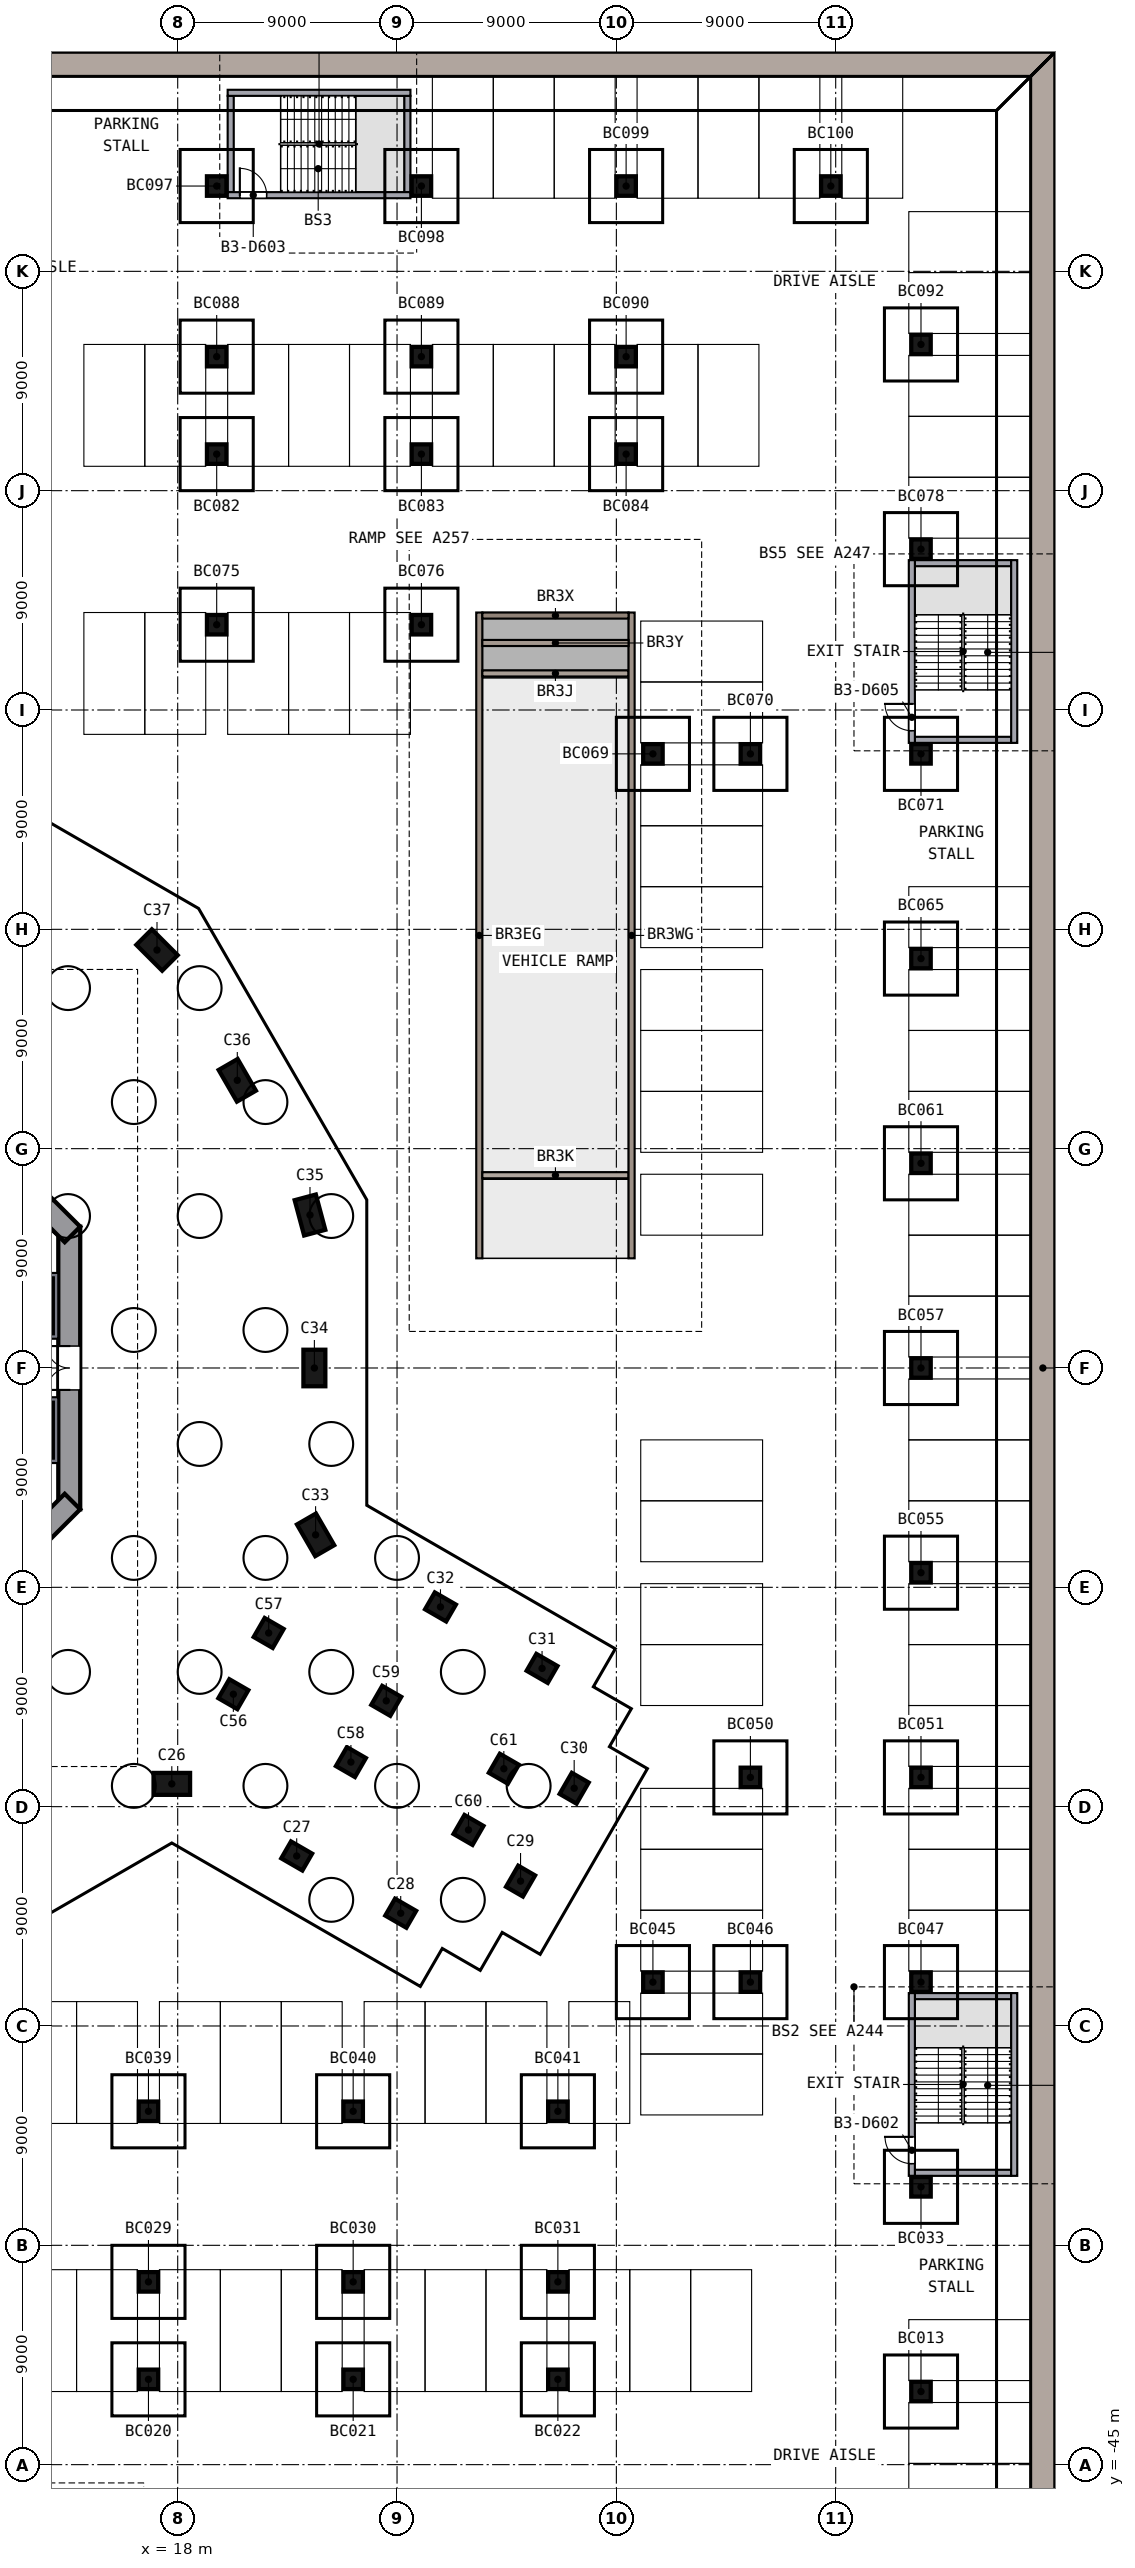
"""IFC4 building model, lengths in metres.
Left out: names, types, materials, properties, quantities, classifications, styles, units other than length and angle.
Written with IfcOpenShell. Run it as: python <this file> out.ifc"""

import sys

from ifc_helpers import new_model, si_unit, direction, frame, frame_2d, origin, origin_2d, place, context, subcontext, project, spatial, polyline, rectangle, outline, extrude, element, fill, save


model = new_model("IFC4")
c1 = context("Model", 3, precision=1e-05, world=origin(), true_north=direction((0.0, 1.0)))
c2 = subcontext(c1, "Body", "Model", "MODEL_VIEW")
j1 = project(units=[si_unit("LENGTHUNIT", "METRE"), si_unit("PLANEANGLEUNIT", "RADIAN")], contexts=[c1])
p1 = place(None, origin())
s1 = spatial("IfcSite", under=j1, at=p1, CompositionType="ELEMENT")
p2 = place(p1, origin())
s2 = spatial("IfcBuilding", under=s1, at=p2, CompositionType="ELEMENT")
p3 = place(p2, frame((0.0, 0.0, -11.7)))
s3 = spatial("IfcBuildingStorey", under=s2, at=p3, CompositionType="ELEMENT", Elevation=-11.7)
p4 = place(p3, frame((17.758, -17.065, 0.0), z_axis=(0.0, 0.0, 1.0), x_axis=(-1.0, 0.0, 0.0)))
e1 = element("IfcColumn", 1, at=p4, inside=s3, PredefinedType="COLUMN", context=c2, shape_type="SweptSolid", body=[
    extrude(rectangle(XDim=1.5, YDim=0.9, at=origin_2d()), origin(), (0.0, 0.0, 1.0), 3.45),
])
for number, where, z_axis, x_axis in (
    (2, (22.883, -20.024, 0.0), (0.0, 0.0, 1.0), (0.866, -0.5, 0.0)),
    (3, (27.151, -22.373, 0.0), (0.0, 0.0, 1.0), (0.866, -0.5, 0.0)),
    (4, (32.069, -21.055, 0.0), (0.0, 0.0, 1.0), (0.5, 0.866, 0.0)),
    (5, (34.269, -17.245, 0.0), (0.0, 0.0, 1.0), (0.5, 0.866, 0.0)),
    (6, (32.951, -12.327, 0.0), (0.0, 0.0, 1.0), (-0.866, 0.5, 0.0)),
    (7, (28.783, -9.805, 0.0), (0.0, 0.0, 1.0), (-0.866, 0.5, 0.0)),
):
    element("IfcColumn", number, at=place(p3, frame(where, z_axis=z_axis, x_axis=x_axis)), inside=s3, PredefinedType="COLUMN", context=c2, shape_type="SweptSolid", body=[
        extrude(rectangle(XDim=1.0, YDim=0.8, at=origin_2d()), origin(), (0.0, 0.0, 1.0), 3.45),
    ])
for number, where, z_axis, x_axis in (
    (8, (23.658, -6.846, 0.0), (0.0, 0.0, 1.0), (0.5, -0.866, 0.0)),
    (9, (23.608, 0.0, 0.0), (0.0, 0.0, 1.0), (0.0, 1.0, 0.0)),
    (10, (23.428, 6.278, 0.0), (0.0, 0.0, 1.0), (0.259, -0.966, 0.0)),
    (11, (20.445, 11.804, 0.0), (0.0, 0.0, 1.0), (-0.5, 0.866, 0.0)),
    (12, (17.151, 17.151, 0.0), (0.0, 0.0, 1.0), (0.707, -0.707, 0.0)),
):
    element("IfcColumn", number, at=place(p3, frame(where, z_axis=z_axis, x_axis=x_axis)), inside=s3, PredefinedType="COLUMN", context=c2, shape_type="SweptSolid", body=[
        extrude(rectangle(XDim=1.5, YDim=0.9, at=origin_2d()), origin(), (0.0, 0.0, 1.0), 3.45),
    ])
for number, where, z_axis, x_axis in (
    (13, (20.283, -13.385, 0.0), (0.0, 0.0, 1.0), (0.866, -0.5, 0.0)),
    (14, (21.733, -10.873, 0.0), (0.0, 0.0, 1.0), (0.866, -0.5, 0.0)),
    (15, (25.108, -16.17, 0.0), (0.0, 0.0, 1.0), (0.866, -0.5, 0.0)),
    (16, (26.558, -13.659, 0.0), (0.0, 0.0, 1.0), (0.866, -0.5, 0.0)),
    (17, (29.932, -18.956, 0.0), (0.0, 0.0, 1.0), (0.866, -0.5, 0.0)),
    (18, (31.382, -16.444, 0.0), (0.0, 0.0, 1.0), (0.866, -0.5, 0.0)),
):
    element("IfcColumn", number, at=place(p3, frame(where, z_axis=z_axis, x_axis=x_axis)), inside=s3, PredefinedType="COLUMN", context=c2, shape_type="SweptSolid", body=[
        extrude(rectangle(XDim=0.9, YDim=0.9, at=origin_2d()), origin(), (0.0, 0.0, 1.0), 3.45),
    ])
p5 = place(p3, frame((13.55, -5.799, 0.0), z_axis=(0.0, 0.0, 1.0), x_axis=(0.0, 1.0, 0.0)))
e19 = element("IfcWall", 19, at=p5, inside=s3, PredefinedType="SHEAR", context=c2, shape_type="SweptSolid", body=[
    extrude(rectangle(XDim=11.598, YDim=0.9, at=frame_2d((5.799, 0.0))), origin(), (0.0, 0.0, 1.0), 3.9),
])
p6 = place(p5, frame((4.899, 0.0, 0.0)))
e20 = element("IfcOpeningElement", 20, at=p6, cuts=e19, PredefinedType="OPENING", context=c2, shape_type="SweptSolid", body=[
    extrude(rectangle(XDim=1.8, YDim=2.1, at=frame_2d((0.9, 1.05))), frame((0.0, 0.46, 0.0), z_axis=(0.0, -1.0, 0.0), x_axis=(1.0, 0.0, 0.0)), (0.0, 0.0, 1.0), 0.92),
])
for number, where, z_axis, x_axis in (
    (21, (13.682, 5.481, 0.0), (0.0, 0.0, 1.0), (-0.707, 0.707, 0.0)),
    (22, (5.481, -13.682, 0.0), (0.0, 0.0, 1.0), (0.707, 0.707, 0.0)),
):
    element("IfcWall", number, at=place(p3, frame(where, z_axis=z_axis, x_axis=x_axis)), inside=s3, PredefinedType="SHEAR", context=c2, shape_type="SweptSolid", body=[
        extrude(rectangle(XDim=11.598, YDim=0.9, at=frame_2d((5.799, 0.0))), origin(), (0.0, 0.0, 1.0), 3.9),
    ])
p7 = place(p3, frame((0.0, 0.0, -0.8)))
e23 = element("IfcWall", 23, at=p7, inside=s3, PredefinedType="SOLIDWALL", context=c2, shape_type="SweptSolid", body=[
    extrude(outline(polyline([(54.0, 54.0), (-54.0, 54.0), (-53.0, 53.0), (53.0, 53.0), (54.0, 54.0)])), origin(), (0.0, 0.0, 1.0), 4.7),
])
p8 = place(p3, frame((0.0, 0.0, -0.8)))
e24 = element("IfcWall", 24, at=p8, inside=s3, PredefinedType="SOLIDWALL", context=c2, shape_type="SweptSolid", body=[
    extrude(outline(polyline([(54.0, -54.0), (54.0, 54.0), (53.0, 53.0), (53.0, -53.0), (54.0, -54.0)])), origin(), (0.0, 0.0, 1.0), 4.7),
])
for number, where, z_axis, x_axis in (
    (25, (48.5, -42.0, -0.8), (0.0, 0.0, 1.0), (1.0, 0.0, 0.0)),
    (26, (16.8, -41.5, -0.8), (0.0, 0.0, 1.0), (1.0, 0.0, 0.0)),
    (27, (25.2, -41.5, -0.8), (0.0, 0.0, 1.0), (1.0, 0.0, 0.0)),
    (28, (33.6, -41.5, -0.8), (0.0, 0.0, 1.0), (1.0, 0.0, 0.0)),
    (29, (16.8, -37.5, -0.8), (0.0, 0.0, 1.0), (1.0, 0.0, 0.0)),
    (30, (25.2, -37.5, -0.8), (0.0, 0.0, 1.0), (1.0, 0.0, 0.0)),
    (31, (33.6, -37.5, -0.8), (0.0, 0.0, 1.0), (1.0, 0.0, 0.0)),
    (32, (48.5, -33.6, -0.8), (0.0, 0.0, 1.0), (1.0, 0.0, 0.0)),
    (33, (16.8, -30.5, -0.8), (0.0, 0.0, 1.0), (1.0, 0.0, 0.0)),
    (34, (25.2, -30.5, -0.8), (0.0, 0.0, 1.0), (1.0, 0.0, 0.0)),
    (35, (33.6, -30.5, -0.8), (0.0, 0.0, 1.0), (1.0, 0.0, 0.0)),
    (36, (37.5, -25.2, -0.8), (0.0, 0.0, 1.0), (1.0, 0.0, 0.0)),
    (37, (41.5, -25.2, -0.8), (0.0, 0.0, 1.0), (1.0, 0.0, 0.0)),
    (38, (48.5, -25.2, -0.8), (0.0, 0.0, 1.0), (1.0, 0.0, 0.0)),
    (39, (41.5, -16.8, -0.8), (0.0, 0.0, 1.0), (1.0, 0.0, 0.0)),
    (40, (48.5, -16.8, -0.8), (0.0, 0.0, 1.0), (1.0, 0.0, 0.0)),
    (41, (48.5, -8.4, -0.8), (0.0, 0.0, 1.0), (1.0, 0.0, 0.0)),
    (42, (48.5, 0.0, -0.8), (0.0, 0.0, 1.0), (1.0, 0.0, 0.0)),
    (43, (48.5, 8.4, -0.8), (0.0, 0.0, 1.0), (1.0, 0.0, 0.0)),
    (44, (48.5, 16.8, -0.8), (0.0, 0.0, 1.0), (1.0, 0.0, 0.0)),
    (45, (37.5, 25.2, -0.8), (0.0, 0.0, 1.0), (1.0, 0.0, 0.0)),
    (46, (41.5, 25.2, -0.8), (0.0, 0.0, 1.0), (1.0, 0.0, 0.0)),
    (47, (48.5, 25.2, -0.8), (0.0, 0.0, 1.0), (1.0, 0.0, 0.0)),
    (48, (19.6, 30.5, -0.8), (0.0, 0.0, 1.0), (1.0, 0.0, 0.0)),
    (49, (28.0, 30.5, -0.8), (0.0, 0.0, 1.0), (1.0, 0.0, 0.0)),
    (50, (48.5, 33.6, -0.8), (0.0, 0.0, 1.0), (1.0, 0.0, 0.0)),
    (51, (19.6, 37.5, -0.8), (0.0, 0.0, 1.0), (1.0, 0.0, 0.0)),
    (52, (28.0, 37.5, -0.8), (0.0, 0.0, 1.0), (1.0, 0.0, 0.0)),
    (53, (36.4, 37.5, -0.8), (0.0, 0.0, 1.0), (1.0, 0.0, 0.0)),
    (54, (19.6, 41.5, -0.8), (0.0, 0.0, 1.0), (1.0, 0.0, 0.0)),
    (55, (28.0, 41.5, -0.8), (0.0, 0.0, 1.0), (1.0, 0.0, 0.0)),
    (56, (36.4, 41.5, -0.8), (0.0, 0.0, 1.0), (1.0, 0.0, 0.0)),
    (57, (48.5, 42.0, -0.8), (0.0, 0.0, 1.0), (1.0, 0.0, 0.0)),
    (58, (19.6, 48.5, -0.8), (0.0, 0.0, 1.0), (1.0, 0.0, 0.0)),
    (59, (28.0, 48.5, -0.8), (0.0, 0.0, 1.0), (1.0, 0.0, 0.0)),
    (60, (36.4, 48.5, -0.8), (0.0, 0.0, 1.0), (1.0, 0.0, 0.0)),
    (61, (44.8, 48.5, -0.8), (0.0, 0.0, 1.0), (1.0, 0.0, 0.0)),
):
    element("IfcColumn", number, at=place(p3, frame(where, z_axis=z_axis, x_axis=x_axis)), inside=s3, PredefinedType="COLUMN", context=c2, shape_type="SweptSolid", body=[
        extrude(rectangle(XDim=0.8, YDim=0.8, at=origin_2d()), origin(), (0.0, 0.0, 1.0), 4.7),
    ])
for number, where, z_axis, x_axis in (
    (62, (36.625, 31.0, 0.0), (0.0, 0.0, 1.0), (0.0, -1.0, 0.0)),
    (63, (30.375, 31.0, 0.0), (0.0, 0.0, 1.0), (0.0, -1.0, 0.0)),
):
    element("IfcWall", number, at=place(p3, frame(where, z_axis=z_axis, x_axis=x_axis)), inside=s3, PredefinedType="SOLIDWALL", context=c2, shape_type="SweptSolid", body=[
        extrude(rectangle(XDim=26.5, YDim=0.25, at=frame_2d((13.25, 0.0))), origin(), (0.0, 0.0, 1.0), 5.02),
    ])
p9 = place(p3, frame((36.5, 30.875, 0.0), z_axis=(0.0, 0.0, 1.0), x_axis=(-1.0, 0.0, 0.0)))
e64 = element("IfcWall", 64, at=p9, inside=s3, PredefinedType="SOLIDWALL", context=c2, shape_type="SweptSolid", body=[
    extrude(rectangle(XDim=6.0, YDim=0.25, at=frame_2d((3.0, 0.0))), origin(), (0.0, 0.0, 1.0), 3.55),
])
p10 = place(p3, frame((36.5, 28.5, 0.0), z_axis=(0.0, 0.0, 1.0), x_axis=(-1.0, 0.0, 0.0)))
e65 = element("IfcWall", 65, at=p10, inside=s3, PredefinedType="SOLIDWALL", context=c2, shape_type="SweptSolid", body=[
    extrude(rectangle(XDim=6.0, YDim=0.25, at=frame_2d((3.0, 0.0))), origin(), (0.0, 0.0, 1.0), 3.734),
])
p11 = place(p3, frame((36.5, 7.909, 0.0), z_axis=(0.0, 0.0, 1.0), x_axis=(-1.0, 0.0, 0.0)))
e66 = element("IfcWall", 66, at=p11, inside=s3, PredefinedType="SOLIDWALL", context=c2, shape_type="SweptSolid", body=[
    extrude(rectangle(XDim=6.0, YDim=0.25, at=frame_2d((3.0, 0.0))), origin(), (0.0, 0.0, 1.0), 0.395),
])
p12 = place(p3, frame((36.5, 29.75, 0.0), z_axis=(0.0, 0.0, 1.0), x_axis=(-1.0, 0.0, 0.0)))
e67 = element("IfcWall", 67, at=p12, inside=s3, PredefinedType="SOLIDWALL", context=c2, shape_type="SweptSolid", body=[
    extrude(rectangle(XDim=6.0, YDim=0.25, at=frame_2d((3.0, 0.0))), origin(), (0.0, 0.0, 1.0), 3.471),
])
p13 = place(p3, origin())
e68 = element("IfcWall", 68, at=p13, inside=s3, PredefinedType="SOLIDWALL", context=c2, shape_type="SweptSolid", body=[
    extrude(outline(polyline([(13.1, -3.9), (10.9, -3.9), (10.9, -3.7), (12.9, -3.7), (12.9, -1.4), (10.9, -1.4), (10.9, -1.2), (13.1, -1.2), (13.1, -3.9)])), origin(), (0.0, 0.0, 1.0), 3.45),
])
p14 = place(p3, origin())
e69 = element("IfcWall", 69, at=p14, inside=s3, PredefinedType="SOLIDWALL", context=c2, shape_type="SweptSolid", body=[
    extrude(outline(polyline([(13.1, 3.9), (13.1, 1.2), (10.9, 1.2), (10.9, 1.4), (12.9, 1.4), (12.9, 3.7), (10.9, 3.7), (10.9, 3.9), (13.1, 3.9)])), origin(), (0.0, 0.0, 1.0), 3.45),
])
p15 = place(p3, frame((48.125, -33.15, 0.0), z_axis=(0.0, 0.0, 1.0), x_axis=(0.0, 1.0, 0.0)))
e70 = element("IfcWall", 70, at=p15, inside=s3, PredefinedType="SOLIDWALL", context=c2, shape_type="SweptSolid", body=[
    extrude(rectangle(XDim=7.5, YDim=0.25, at=frame_2d((3.75, 0.0))), origin(), (0.0, 0.0, 1.0), 3.9),
])
p16 = place(p15, frame((0.5, 0.0, 0.0)))
e71 = element("IfcOpeningElement", 71, at=p16, cuts=e70, PredefinedType="OPENING", context=c2, shape_type="SweptSolid", body=[
    extrude(rectangle(XDim=1.1, YDim=2.1, at=frame_2d((0.55, 1.05))), frame((0.0, 0.135, 0.0), z_axis=(0.0, -1.0, 0.0), x_axis=(1.0, 0.0, 0.0)), (0.0, 0.0, 1.0), 0.27),
])
p17 = place(p3, frame((52.325, -33.15, 0.0), z_axis=(0.0, 0.0, 1.0), x_axis=(0.0, 1.0, 0.0)))
e72 = element("IfcWall", 72, at=p17, inside=s3, PredefinedType="SOLIDWALL", context=c2, shape_type="SweptSolid", body=[
    extrude(rectangle(XDim=7.5, YDim=0.25, at=frame_2d((3.75, 0.0))), origin(), (0.0, 0.0, 1.0), 3.9),
])
for number, where, z_axis, x_axis in (
    (73, (52.2, -33.025, 0.0), (0.0, 0.0, 1.0), (-1.0, 0.0, 0.0)),
    (74, (52.2, -25.775, 0.0), (0.0, 0.0, 1.0), (-1.0, 0.0, 0.0)),
):
    element("IfcWall", number, at=place(p3, frame(where, z_axis=z_axis, x_axis=x_axis)), inside=s3, PredefinedType="SOLIDWALL", context=c2, shape_type="SweptSolid", body=[
        extrude(rectangle(XDim=3.95, YDim=0.25, at=frame_2d((1.975, 0.0))), origin(), (0.0, 0.0, 1.0), 3.9),
    ])
p18 = place(p3, frame((20.05, 52.325, 0.0), z_axis=(0.0, 0.0, 1.0), x_axis=(1.0, 0.0, 0.0)))
e75 = element("IfcWall", 75, at=p18, inside=s3, PredefinedType="SOLIDWALL", context=c2, shape_type="SweptSolid", body=[
    extrude(rectangle(XDim=7.5, YDim=0.25, at=frame_2d((3.75, 0.0))), origin(), (0.0, 0.0, 1.0), 3.9),
])
p19 = place(p3, frame((20.05, 48.125, 0.0), z_axis=(0.0, 0.0, 1.0), x_axis=(1.0, 0.0, 0.0)))
e76 = element("IfcWall", 76, at=p19, inside=s3, PredefinedType="SOLIDWALL", context=c2, shape_type="SweptSolid", body=[
    extrude(rectangle(XDim=7.5, YDim=0.25, at=frame_2d((3.75, 0.0))), origin(), (0.0, 0.0, 1.0), 3.9),
])
p20 = place(p19, frame((0.5, 0.0, 0.0)))
e77 = element("IfcOpeningElement", 77, at=p20, cuts=e76, PredefinedType="OPENING", context=c2, shape_type="SweptSolid", body=[
    extrude(rectangle(XDim=1.1, YDim=2.1, at=frame_2d((0.55, 1.05))), frame((0.0, 0.135, 0.0), z_axis=(0.0, -1.0, 0.0), x_axis=(1.0, 0.0, 0.0)), (0.0, 0.0, 1.0), 0.27),
])
for number, where, z_axis, x_axis in (
    (78, (20.175, 48.25, 0.0), (0.0, 0.0, 1.0), (0.0, 1.0, 0.0)),
    (79, (27.425, 48.25, 0.0), (0.0, 0.0, 1.0), (0.0, 1.0, 0.0)),
):
    element("IfcWall", number, at=place(p3, frame(where, z_axis=z_axis, x_axis=x_axis)), inside=s3, PredefinedType="SOLIDWALL", context=c2, shape_type="SweptSolid", body=[
        extrude(rectangle(XDim=3.95, YDim=0.25, at=frame_2d((1.975, 0.0))), origin(), (0.0, 0.0, 1.0), 3.9),
    ])
p21 = place(p3, frame((48.125, 25.65, 0.0), z_axis=(0.0, 0.0, 1.0), x_axis=(0.0, 1.0, 0.0)))
e80 = element("IfcWall", 80, at=p21, inside=s3, PredefinedType="SOLIDWALL", context=c2, shape_type="SweptSolid", body=[
    extrude(rectangle(XDim=7.5, YDim=0.25, at=frame_2d((3.75, 0.0))), origin(), (0.0, 0.0, 1.0), 3.9),
])
p22 = place(p21, frame((0.5, 0.0, 0.0)))
e81 = element("IfcOpeningElement", 81, at=p22, cuts=e80, PredefinedType="OPENING", context=c2, shape_type="SweptSolid", body=[
    extrude(rectangle(XDim=1.1, YDim=2.1, at=frame_2d((0.55, 1.05))), frame((0.0, 0.135, 0.0), z_axis=(0.0, -1.0, 0.0), x_axis=(1.0, 0.0, 0.0)), (0.0, 0.0, 1.0), 0.27),
])
p23 = place(p3, frame((52.325, 25.65, 0.0), z_axis=(0.0, 0.0, 1.0), x_axis=(0.0, 1.0, 0.0)))
e82 = element("IfcWall", 82, at=p23, inside=s3, PredefinedType="SOLIDWALL", context=c2, shape_type="SweptSolid", body=[
    extrude(rectangle(XDim=7.5, YDim=0.25, at=frame_2d((3.75, 0.0))), origin(), (0.0, 0.0, 1.0), 3.9),
])
for number, where, z_axis, x_axis in (
    (83, (52.2, 25.775, 0.0), (0.0, 0.0, 1.0), (-1.0, 0.0, 0.0)),
    (84, (52.2, 33.025, 0.0), (0.0, 0.0, 1.0), (-1.0, 0.0, 0.0)),
):
    element("IfcWall", number, at=place(p3, frame(where, z_axis=z_axis, x_axis=x_axis)), inside=s3, PredefinedType="SOLIDWALL", context=c2, shape_type="SweptSolid", body=[
        extrude(rectangle(XDim=3.95, YDim=0.25, at=frame_2d((1.975, 0.0))), origin(), (0.0, 0.0, 1.0), 3.9),
    ])
p24 = place(p6, origin())
e85 = element("IfcDoor", 85, at=p24, inside=s3, OperationType="DOUBLE_DOOR_SINGLE_SWING", PredefinedType="DOOR", context=c2, shape_type="SweptSolid", body=[
    extrude(rectangle(XDim=1.8, YDim=2.1, at=frame_2d((0.9, 1.05))), frame((0.0, 0.025, 0.0), z_axis=(0.0, -1.0, 0.0), x_axis=(1.0, 0.0, 0.0)), (0.0, 0.0, 1.0), 0.05),
])
fill(e20, e85)
p25 = place(p16, origin())
e86 = element("IfcDoor", 86, at=p25, inside=s3, OperationType="SINGLE_SWING_RIGHT", PredefinedType="DOOR", context=c2, shape_type="SweptSolid", body=[
    extrude(rectangle(XDim=1.1, YDim=2.1, at=frame_2d((0.55, 1.05))), frame((0.0, 0.025, 0.0), z_axis=(0.0, -1.0, 0.0), x_axis=(1.0, 0.0, 0.0)), (0.0, 0.0, 1.0), 0.05),
])
fill(e71, e86)
p26 = place(p20, origin())
e87 = element("IfcDoor", 87, at=p26, inside=s3, OperationType="SINGLE_SWING_LEFT", PredefinedType="DOOR", context=c2, shape_type="SweptSolid", body=[
    extrude(rectangle(XDim=1.1, YDim=2.1, at=frame_2d((0.55, 1.05))), frame((0.0, 0.025, 0.0), z_axis=(0.0, -1.0, 0.0), x_axis=(1.0, 0.0, 0.0)), (0.0, 0.0, 1.0), 0.05),
])
fill(e77, e87)
p27 = place(p22, origin())
e88 = element("IfcDoor", 88, at=p27, inside=s3, OperationType="SINGLE_SWING_RIGHT", PredefinedType="DOOR", context=c2, shape_type="SweptSolid", body=[
    extrude(rectangle(XDim=1.1, YDim=2.1, at=frame_2d((0.55, 1.05))), frame((0.0, 0.025, 0.0), z_axis=(0.0, -1.0, 0.0), x_axis=(1.0, 0.0, 0.0)), (0.0, 0.0, 1.0), 0.05),
])
fill(e81, e88)
save(model, sys.argv[1])
